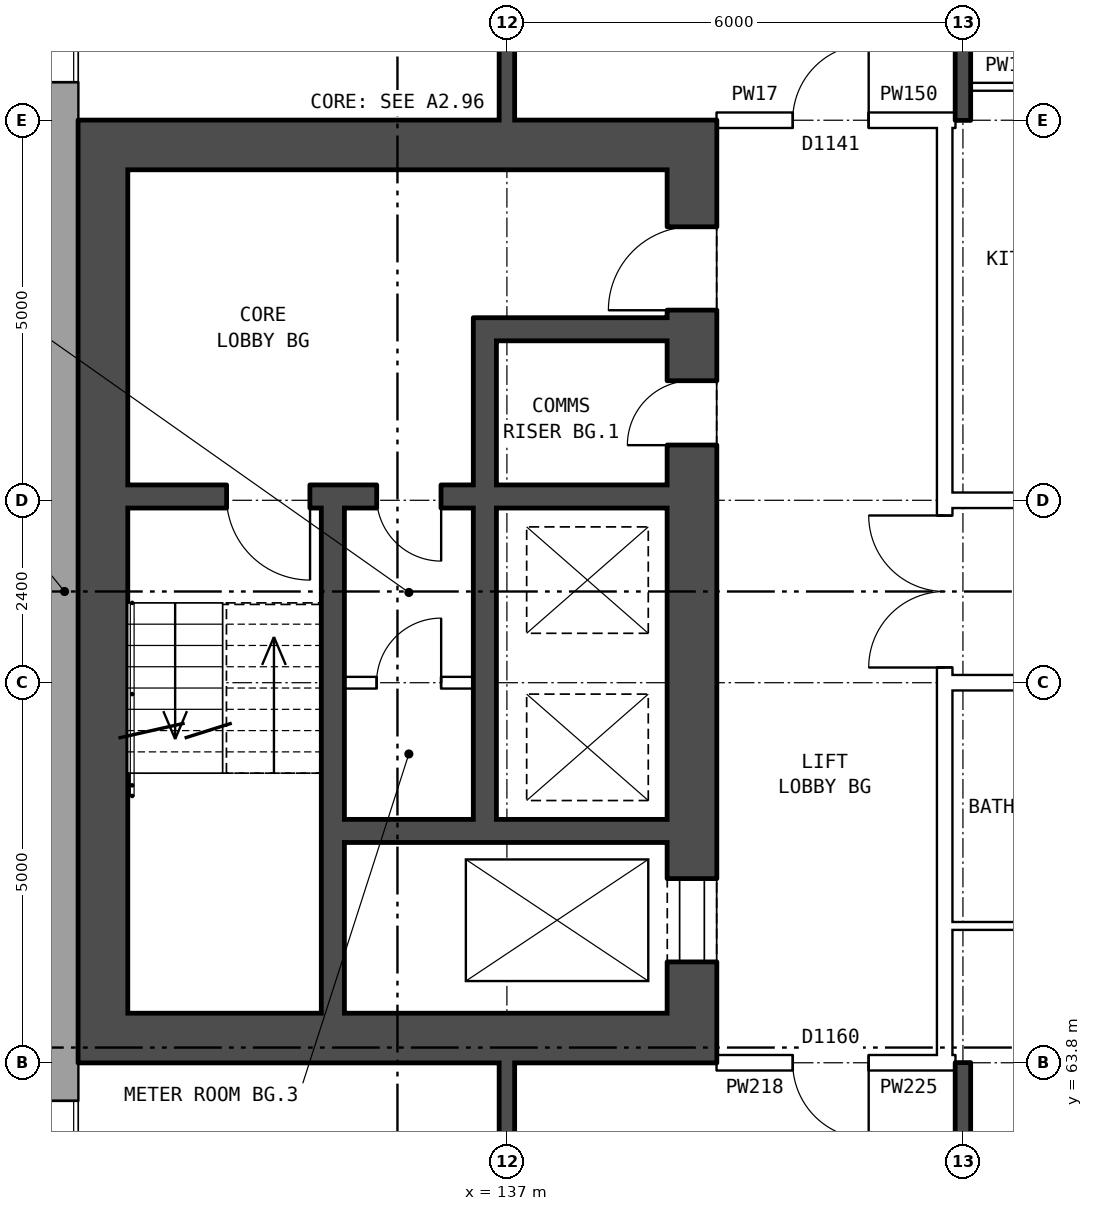
"""IFC4 building model, lengths in metres.
Left out: names, types, materials, properties, quantities, classifications, styles, units other than length and angle.
Written with IfcOpenShell. Run it as: python <this file> out.ifc"""

import sys

from ifc_helpers import new_model, si_unit, direction, frame, frame_2d, origin, place, context, subcontext, project, spatial, rectangle, extrude, element, fill, save


model = new_model("IFC4")
c1 = context("Model", 3, precision=1e-05, world=origin(), true_north=direction((0.0, 1.0)))
c2 = subcontext(c1, "Body", "Model", "MODEL_VIEW")
j1 = project(units=[si_unit("LENGTHUNIT", "METRE"), si_unit("PLANEANGLEUNIT", "RADIAN")], contexts=[c1])
p1 = place(None, origin())
s1 = spatial("IfcSite", under=j1, at=p1, CompositionType="ELEMENT")
p2 = place(p1, origin())
s2 = spatial("IfcBuilding", under=s1, at=p2, CompositionType="ELEMENT")
p3 = place(p2, frame((0.0, 0.0, 96.4)))
s3 = spatial("IfcBuildingStorey", under=s2, at=p3, CompositionType="ELEMENT", Elevation=96.4)
p4 = place(p3, frame((131.18, 82.925, 0.0), z_axis=(0.0, 0.0, 1.0), x_axis=(0.0, -1.0, 0.0)))
e1 = element("IfcWall", 1, at=p4, inside=s3, PredefinedType="STANDARD", context=c2, shape_type="SweptSolid", body=[
    extrude(rectangle(XDim=25.851, YDim=0.36, at=frame_2d((12.925, 0.0))), origin(), (0.0, 0.0, 1.0), 2.85),
])
p5 = place(p4, frame((1.425, 0.0, 0.8)))
e2 = element("IfcOpeningElement", 2, at=p5, cuts=e1, PredefinedType="OPENING", context=c2, shape_type="SweptSolid", body=[
    extrude(rectangle(XDim=1.0, YDim=1.2, at=frame_2d((0.5, 0.6))), frame((0.0, 0.19, 0.0), z_axis=(0.0, -1.0, 0.0), x_axis=(1.0, 0.0, 0.0)), (0.0, 0.0, 1.0), 0.38),
])
p6 = place(p4, frame((4.625, 0.0, 0.8)))
e3 = element("IfcOpeningElement", 3, at=p6, cuts=e1, PredefinedType="OPENING", context=c2, shape_type="SweptSolid", body=[
    extrude(rectangle(XDim=1.6, YDim=1.8, at=frame_2d((0.8, 0.9))), frame((0.0, 0.19, 0.0), z_axis=(0.0, -1.0, 0.0), x_axis=(1.0, 0.0, 0.0)), (0.0, 0.0, 1.0), 0.38),
])
p7 = place(p4, frame((19.625, 0.0, 0.8)))
e4 = element("IfcOpeningElement", 4, at=p7, cuts=e1, PredefinedType="OPENING", context=c2, shape_type="SweptSolid", body=[
    extrude(rectangle(XDim=1.6, YDim=1.8, at=frame_2d((0.8, 0.9))), frame((0.0, 0.19, 0.0), z_axis=(0.0, -1.0, 0.0), x_axis=(1.0, 0.0, 0.0)), (0.0, 0.0, 1.0), 0.38),
])
p8 = place(p4, frame((21.525, 0.0, 0.8)))
e5 = element("IfcOpeningElement", 5, at=p8, cuts=e1, PredefinedType="OPENING", context=c2, shape_type="SweptSolid", body=[
    extrude(rectangle(XDim=1.4, YDim=1.8, at=frame_2d((0.7, 0.9))), frame((0.0, 0.19, 0.0), z_axis=(0.0, -1.0, 0.0), x_axis=(1.0, 0.0, 0.0)), (0.0, 0.0, 1.0), 0.38),
])
p9 = place(p4, frame((2.725, 0.0, 0.8)))
e6 = element("IfcOpeningElement", 6, at=p9, cuts=e1, PredefinedType="OPENING", context=c2, shape_type="SweptSolid", body=[
    extrude(rectangle(XDim=1.4, YDim=1.8, at=frame_2d((0.7, 0.9))), frame((0.0, 0.19, 0.0), z_axis=(0.0, -1.0, 0.0), x_axis=(1.0, 0.0, 0.0)), (0.0, 0.0, 1.0), 0.38),
])
p10 = place(p4, frame((23.225, 0.0, 0.8)))
e7 = element("IfcOpeningElement", 7, at=p10, cuts=e1, PredefinedType="OPENING", context=c2, shape_type="SweptSolid", body=[
    extrude(rectangle(XDim=1.0, YDim=1.2, at=frame_2d((0.5, 0.6))), frame((0.0, 0.19, 0.0), z_axis=(0.0, -1.0, 0.0), x_axis=(1.0, 0.0, 0.0)), (0.0, 0.0, 1.0), 0.38),
])
p11 = place(p3, frame((139.435, 64.45, 0.0), z_axis=(0.0, 0.0, 1.0), x_axis=(0.0, 1.0, 0.0)))
e8 = element("IfcWall", 8, at=p11, inside=s3, PredefinedType="SHEAR", context=c2, shape_type="SweptSolid", body=[
    extrude(rectangle(XDim=11.1, YDim=0.65, at=frame_2d((5.55, 0.0))), origin(), (0.0, 0.0, 1.0), 2.85),
])
p12 = place(p11, frame((0.675, 0.0, 0.0)))
e9 = element("IfcOpeningElement", 9, at=p12, cuts=e8, PredefinedType="OPENING", context=c2, shape_type="SweptSolid", body=[
    extrude(rectangle(XDim=1.1, YDim=2.1, at=frame_2d((0.55, 1.05))), frame((0.0, 0.335, 0.0), z_axis=(0.0, -1.0, 0.0), x_axis=(1.0, 0.0, 0.0)), (0.0, 0.0, 1.0), 0.67),
])
p13 = place(p11, frame((9.25, 0.0, 0.0)))
e10 = element("IfcOpeningElement", 10, at=p13, cuts=e8, PredefinedType="OPENING", context=c2, shape_type="SweptSolid", body=[
    extrude(rectangle(XDim=1.1, YDim=2.1, at=frame_2d((0.55, 1.05))), frame((0.0, 0.335, 0.0), z_axis=(0.0, -1.0, 0.0), x_axis=(1.0, 0.0, 0.0)), (0.0, 0.0, 1.0), 0.67),
])
p14 = place(p11, frame((7.475, 0.0, 0.0)))
e11 = element("IfcOpeningElement", 11, at=p14, cuts=e8, PredefinedType="OPENING", context=c2, shape_type="SweptSolid", body=[
    extrude(rectangle(XDim=0.85, YDim=2.1, at=frame_2d((0.425, 1.05))), frame((0.0, 0.335, 0.0), z_axis=(0.0, -1.0, 0.0), x_axis=(1.0, 0.0, 0.0)), (0.0, 0.0, 1.0), 0.67),
])
p15 = place(p3, frame((131.685, 64.45, 0.0), z_axis=(0.0, 0.0, 1.0), x_axis=(0.0, 1.0, 0.0)))
e12 = element("IfcWall", 12, at=p15, inside=s3, PredefinedType="SHEAR", context=c2, shape_type="SweptSolid", body=[
    extrude(rectangle(XDim=11.1, YDim=0.65, at=frame_2d((5.55, 0.0))), origin(), (0.0, 0.0, 1.0), 2.85),
])
for number, where, z_axis, x_axis in (
    (13, (139.76, 64.125, 0.0), (0.0, 0.0, 1.0), (-1.0, 0.0, 0.0)),
    (14, (139.76, 75.875, 0.0), (0.0, 0.0, 1.0), (-1.0, 0.0, 0.0)),
):
    element("IfcWall", number, at=place(p3, frame(where, z_axis=z_axis, x_axis=x_axis)), inside=s3, PredefinedType="SHEAR", context=c2, shape_type="SweptSolid", body=[
        extrude(rectangle(XDim=8.4, YDim=0.65, at=frame_2d((4.2, 0.0))), origin(), (0.0, 0.0, 1.0), 2.85),
    ])
p16 = place(p3, frame((139.11, 66.85, 0.0), z_axis=(0.0, 0.0, 1.0), x_axis=(-1.0, 0.0, 0.0)))
e15 = element("IfcWall", 15, at=p16, inside=s3, PredefinedType="SHEAR", context=c2, shape_type="SweptSolid", body=[
    extrude(rectangle(XDim=4.25, YDim=0.3, at=frame_2d((2.125, 0.0))), origin(), (0.0, 0.0, 1.0), 2.85),
])
p17 = place(p3, frame((136.56, 68.8, 0.0), z_axis=(0.0, 0.0, 1.0), x_axis=(-1.0, 0.0, 0.0)))
e16 = element("IfcWall", 16, at=p17, inside=s3, PredefinedType="PARTITIONING", context=c2, shape_type="SweptSolid", body=[
    extrude(rectangle(XDim=1.7, YDim=0.15, at=frame_2d((0.85, 0.0))), origin(), (0.0, 0.0, 1.0), 2.85),
])
p18 = place(p17, frame((0.425, 0.0, 0.0)))
e17 = element("IfcOpeningElement", 17, at=p18, cuts=e16, PredefinedType="OPENING", context=c2, shape_type="SweptSolid", body=[
    extrude(rectangle(XDim=0.85, YDim=2.1, at=frame_2d((0.425, 1.05))), frame((0.0, 0.085, 0.0), z_axis=(0.0, -1.0, 0.0), x_axis=(1.0, 0.0, 0.0)), (0.0, 0.0, 1.0), 0.17),
])
p19 = place(p3, frame((139.11, 71.25, 0.0), z_axis=(0.0, 0.0, 1.0), x_axis=(-1.0, 0.0, 0.0)))
e18 = element("IfcWall", 18, at=p19, inside=s3, PredefinedType="SHEAR", context=c2, shape_type="SweptSolid", body=[
    extrude(rectangle(XDim=7.1, YDim=0.3, at=frame_2d((3.55, 0.0))), origin(), (0.0, 0.0, 1.0), 2.85),
])
p20 = place(p19, frame((4.7, 0.0, 0.0)))
e19 = element("IfcOpeningElement", 19, at=p20, cuts=e18, PredefinedType="OPENING", context=c2, shape_type="SweptSolid", body=[
    extrude(rectangle(XDim=1.1, YDim=2.1, at=frame_2d((0.55, 1.05))), frame((0.0, 0.16, 0.0), z_axis=(0.0, -1.0, 0.0), x_axis=(1.0, 0.0, 0.0)), (0.0, 0.0, 1.0), 0.32),
])
p21 = place(p19, frame((2.975, 0.0, 0.0)))
e20 = element("IfcOpeningElement", 20, at=p21, cuts=e18, PredefinedType="OPENING", context=c2, shape_type="SweptSolid", body=[
    extrude(rectangle(XDim=0.85, YDim=2.1, at=frame_2d((0.425, 1.05))), frame((0.0, 0.16, 0.0), z_axis=(0.0, -1.0, 0.0), x_axis=(1.0, 0.0, 0.0)), (0.0, 0.0, 1.0), 0.32),
])
p22 = place(p3, frame((139.11, 73.45, 0.0), z_axis=(0.0, 0.0, 1.0), x_axis=(-1.0, 0.0, 0.0)))
e21 = element("IfcWall", 21, at=p22, inside=s3, PredefinedType="SHEAR", context=c2, shape_type="SweptSolid", body=[
    extrude(rectangle(XDim=2.25, YDim=0.3, at=frame_2d((1.125, 0.0))), origin(), (0.0, 0.0, 1.0), 2.85),
])
p23 = place(p3, frame((136.71, 67.0, 0.0), z_axis=(0.0, 0.0, 1.0), x_axis=(0.0, 1.0, 0.0)))
e22 = element("IfcWall", 22, at=p23, inside=s3, PredefinedType="SHEAR", context=c2, shape_type="SweptSolid", body=[
    extrude(rectangle(XDim=4.1, YDim=0.3, at=frame_2d((2.05, 0.0))), origin(), (0.0, 0.0, 1.0), 2.85),
])
p24 = place(p3, frame((136.71, 71.4, 0.0), z_axis=(0.0, 0.0, 1.0), x_axis=(0.0, 1.0, 0.0)))
e23 = element("IfcWall", 23, at=p24, inside=s3, PredefinedType="SHEAR", context=c2, shape_type="SweptSolid", body=[
    extrude(rectangle(XDim=2.2, YDim=0.3, at=frame_2d((1.1, 0.0))), origin(), (0.0, 0.0, 1.0), 2.85),
])
p25 = place(p3, frame((134.71, 64.45, 0.0), z_axis=(0.0, 0.0, 1.0), x_axis=(0.0, 1.0, 0.0)))
e24 = element("IfcWall", 24, at=p25, inside=s3, PredefinedType="SHEAR", context=c2, shape_type="SweptSolid", body=[
    extrude(rectangle(XDim=6.65, YDim=0.3, at=frame_2d((3.325, 0.0))), origin(), (0.0, 0.0, 1.0), 2.85),
])
p26 = place(p3, frame((142.76, 63.9, 0.0), z_axis=(0.0, 0.0, 1.0), x_axis=(0.0, 1.0, 0.0)))
e25 = element("IfcWall", 25, at=p26, inside=s3, PredefinedType="PARTITIONING", context=c2, shape_type="SweptSolid", body=[
    extrude(rectangle(XDim=12.2, YDim=0.2, at=frame_2d((6.1, 0.0))), origin(), (0.0, 0.0, 1.0), 2.85),
])
p27 = place(p26, frame((5.1, 0.0, 0.0)))
e26 = element("IfcOpeningElement", 26, at=p27, cuts=e25, PredefinedType="OPENING", context=c2, shape_type="SweptSolid", body=[
    extrude(rectangle(XDim=2.0, YDim=2.1, at=frame_2d((1.0, 1.05))), frame((0.0, 0.11, 0.0), z_axis=(0.0, -1.0, 0.0), x_axis=(1.0, 0.0, 0.0)), (0.0, 0.0, 1.0), 0.22),
])
p28 = place(p3, frame((139.76, 63.8, 0.0), z_axis=(0.0, 0.0, 1.0), x_axis=(1.0, 0.0, 0.0)))
e27 = element("IfcWall", 27, at=p28, inside=s3, PredefinedType="PARTITIONING", context=c2, shape_type="SweptSolid", body=[
    extrude(rectangle(XDim=3.0, YDim=0.2, at=frame_2d((1.5, 0.0))), origin(), (0.0, 0.0, 1.0), 2.85),
])
p29 = place(p28, frame((1.0, 0.0, 0.0)))
e28 = element("IfcOpeningElement", 28, at=p29, cuts=e27, PredefinedType="OPENING", context=c2, shape_type="SweptSolid", body=[
    extrude(rectangle(XDim=1.0, YDim=2.1, at=frame_2d((0.5, 1.05))), frame((0.0, 0.11, 0.0), z_axis=(0.0, -1.0, 0.0), x_axis=(1.0, 0.0, 0.0)), (0.0, 0.0, 1.0), 0.22),
])
p30 = place(p3, frame((142.76, 63.8, 0.0), z_axis=(0.0, 0.0, 1.0), x_axis=(1.0, 0.0, 0.0)))
e29 = element("IfcWall", 29, at=p30, inside=s3, PredefinedType="PARTITIONING", context=c2, shape_type="SweptSolid", body=[
    extrude(rectangle(XDim=0.14, YDim=0.2, at=frame_2d((0.07, 0.0))), origin(), (0.0, 0.0, 1.0), 2.85),
])
p31 = place(p3, frame((142.76, 65.6, 0.0), z_axis=(0.0, 0.0, 1.0), x_axis=(1.0, 0.0, 0.0)))
e30 = element("IfcWall", 30, at=p31, inside=s3, PredefinedType="PARTITIONING", context=c2, shape_type="SweptSolid", body=[
    extrude(rectangle(XDim=3.24, YDim=0.1, at=frame_2d((1.62, 0.0))), origin(), (0.0, 0.0, 1.0), 2.85),
])
p32 = place(p3, frame((142.76, 68.8, 0.0), z_axis=(0.0, 0.0, 1.0), x_axis=(1.0, 0.0, 0.0)))
e31 = element("IfcWall", 31, at=p32, inside=s3, PredefinedType="PARTITIONING", context=c2, shape_type="SweptSolid", body=[
    extrude(rectangle(XDim=14.48, YDim=0.2, at=frame_2d((7.24, 0.0))), origin(), (0.0, 0.0, 1.0), 2.85),
])
p33 = place(p32, frame((4.24, 0.0, 0.0)))
e32 = element("IfcOpeningElement", 32, at=p33, cuts=e31, PredefinedType="OPENING", context=c2, shape_type="SweptSolid", body=[
    extrude(rectangle(XDim=1.0, YDim=2.1, at=frame_2d((0.5, 1.05))), frame((0.0, 0.11, 0.0), z_axis=(0.0, -1.0, 0.0), x_axis=(1.0, 0.0, 0.0)), (0.0, 0.0, 1.0), 0.22),
])
p34 = place(p32, frame((7.24, 0.0, 0.0)))
e33 = element("IfcOpeningElement", 33, at=p34, cuts=e31, PredefinedType="OPENING", context=c2, shape_type="SweptSolid", body=[
    extrude(rectangle(XDim=1.0, YDim=2.1, at=frame_2d((0.5, 1.05))), frame((0.0, 0.11, 0.0), z_axis=(0.0, -1.0, 0.0), x_axis=(1.0, 0.0, 0.0)), (0.0, 0.0, 1.0), 0.22),
])
p35 = place(p3, frame((142.76, 71.2, 0.0), z_axis=(0.0, 0.0, 1.0), x_axis=(1.0, 0.0, 0.0)))
e34 = element("IfcWall", 34, at=p35, inside=s3, PredefinedType="PARTITIONING", context=c2, shape_type="SweptSolid", body=[
    extrude(rectangle(XDim=14.48, YDim=0.2, at=frame_2d((7.24, 0.0))), origin(), (0.0, 0.0, 1.0), 2.85),
])
p36 = place(p35, frame((1.12, 0.0, 0.0)))
e35 = element("IfcOpeningElement", 35, at=p36, cuts=e34, PredefinedType="OPENING", context=c2, shape_type="SweptSolid", body=[
    extrude(rectangle(XDim=1.0, YDim=2.1, at=frame_2d((0.5, 1.05))), frame((0.0, 0.11, 0.0), z_axis=(0.0, -1.0, 0.0), x_axis=(1.0, 0.0, 0.0)), (0.0, 0.0, 1.0), 0.22),
])
p37 = place(p35, frame((10.24, 0.0, 0.0)))
e36 = element("IfcOpeningElement", 36, at=p37, cuts=e34, PredefinedType="OPENING", context=c2, shape_type="SweptSolid", body=[
    extrude(rectangle(XDim=1.0, YDim=2.1, at=frame_2d((0.5, 1.05))), frame((0.0, 0.11, 0.0), z_axis=(0.0, -1.0, 0.0), x_axis=(1.0, 0.0, 0.0)), (0.0, 0.0, 1.0), 0.22),
])
p38 = place(p3, frame((139.76, 76.2, 0.0), z_axis=(0.0, 0.0, 1.0), x_axis=(1.0, 0.0, 0.0)))
e37 = element("IfcWall", 37, at=p38, inside=s3, PredefinedType="PARTITIONING", context=c2, shape_type="SweptSolid", body=[
    extrude(rectangle(XDim=3.0, YDim=0.2, at=frame_2d((1.5, 0.0))), origin(), (0.0, 0.0, 1.0), 2.85),
])
p39 = place(p38, frame((1.0, 0.0, 0.0)))
e38 = element("IfcOpeningElement", 38, at=p39, cuts=e37, PredefinedType="OPENING", context=c2, shape_type="SweptSolid", body=[
    extrude(rectangle(XDim=1.0, YDim=2.1, at=frame_2d((0.5, 1.05))), frame((0.0, 0.11, 0.0), z_axis=(0.0, -1.0, 0.0), x_axis=(1.0, 0.0, 0.0)), (0.0, 0.0, 1.0), 0.22),
])
p40 = place(p3, frame((142.76, 76.2, 0.0), z_axis=(0.0, 0.0, 1.0), x_axis=(1.0, 0.0, 0.0)))
e39 = element("IfcWall", 39, at=p40, inside=s3, PredefinedType="PARTITIONING", context=c2, shape_type="SweptSolid", body=[
    extrude(rectangle(XDim=0.14, YDim=0.2, at=frame_2d((0.07, 0.0))), origin(), (0.0, 0.0, 1.0), 2.85),
])
p41 = place(p3, frame((143.1, 76.64, 0.0), z_axis=(0.0, 0.0, 1.0), x_axis=(1.0, 0.0, 0.0)))
e40 = element("IfcWall", 40, at=p41, inside=s3, PredefinedType="PARTITIONING", context=c2, shape_type="SweptSolid", body=[
    extrude(rectangle(XDim=2.9, YDim=0.1, at=frame_2d((1.45, 0.0))), origin(), (0.0, 0.0, 1.0), 2.85),
])
p42 = place(p41, frame((1.0, 0.0, 0.0)))
e41 = element("IfcOpeningElement", 41, at=p42, cuts=e40, PredefinedType="OPENING", context=c2, shape_type="SweptSolid", body=[
    extrude(rectangle(XDim=0.9, YDim=2.1, at=frame_2d((0.45, 1.05))), frame((0.0, 0.06, 0.0), z_axis=(0.0, -1.0, 0.0), x_axis=(1.0, 0.0, 0.0)), (0.0, 0.0, 1.0), 0.12),
])
p43 = place(p3, frame((137.0, 54.36, 0.0), z_axis=(0.0, 0.0, 1.0), x_axis=(0.0, 1.0, 0.0)))
e42 = element("IfcWall", 42, at=p43, inside=s3, PredefinedType="SOLIDWALL", context=c2, shape_type="SweptSolid", body=[
    extrude(rectangle(XDim=9.44, YDim=0.2, at=frame_2d((4.72, 0.0))), origin(), (0.0, 0.0, 1.0), 2.85),
])
p44 = place(p43, frame((1.37, 0.0, 0.0)))
e43 = element("IfcOpeningElement", 43, at=p44, cuts=e42, PredefinedType="OPENING", context=c2, shape_type="SweptSolid", body=[
    extrude(rectangle(XDim=0.9, YDim=2.1, at=frame_2d((0.45, 1.05))), frame((0.0, 0.11, 0.0), z_axis=(0.0, -1.0, 0.0), x_axis=(1.0, 0.0, 0.0)), (0.0, 0.0, 1.0), 0.22),
])
p45 = place(p43, frame((7.04, 0.0, 0.0)))
e44 = element("IfcOpeningElement", 44, at=p45, cuts=e42, PredefinedType="OPENING", context=c2, shape_type="SweptSolid", body=[
    extrude(rectangle(XDim=0.9, YDim=2.1, at=frame_2d((0.45, 1.05))), frame((0.0, 0.11, 0.0), z_axis=(0.0, -1.0, 0.0), x_axis=(1.0, 0.0, 0.0)), (0.0, 0.0, 1.0), 0.22),
])
p46 = place(p3, frame((137.0, 76.2, 0.0), z_axis=(0.0, 0.0, 1.0), x_axis=(0.0, 1.0, 0.0)))
e45 = element("IfcWall", 45, at=p46, inside=s3, PredefinedType="SOLIDWALL", context=c2, shape_type="SweptSolid", body=[
    extrude(rectangle(XDim=9.44, YDim=0.2, at=frame_2d((4.72, 0.0))), origin(), (0.0, 0.0, 1.0), 2.85),
])
p47 = place(p46, frame((1.35, 0.0, 0.0)))
e46 = element("IfcOpeningElement", 46, at=p47, cuts=e45, PredefinedType="OPENING", context=c2, shape_type="SweptSolid", body=[
    extrude(rectangle(XDim=0.9, YDim=2.1, at=frame_2d((0.45, 1.05))), frame((0.0, 0.11, 0.0), z_axis=(0.0, -1.0, 0.0), x_axis=(1.0, 0.0, 0.0)), (0.0, 0.0, 1.0), 0.22),
])
for number, where, z_axis, x_axis in (
    (47, (143.0, 54.36, 0.0), (0.0, 0.0, 1.0), (0.0, 1.0, 0.0)),
    (48, (143.0, 76.2, 0.0), (0.0, 0.0, 1.0), (0.0, 1.0, 0.0)),
):
    element("IfcWall", number, at=place(p3, frame(where, z_axis=z_axis, x_axis=x_axis)), inside=s3, PredefinedType="SOLIDWALL", context=c2, shape_type="SweptSolid", body=[
        extrude(rectangle(XDim=9.44, YDim=0.2, at=frame_2d((4.72, 0.0))), origin(), (0.0, 0.0, 1.0), 2.85),
    ])
p48 = place(p6, origin())
e49 = element("IfcWindow", 49, at=p48, inside=s3, PartitioningType="SINGLE_PANEL", PredefinedType="WINDOW", context=c2, shape_type="SweptSolid", body=[
    extrude(rectangle(XDim=1.6, YDim=1.8, at=frame_2d((0.8, 0.9))), frame((0.0, 0.15, 0.0), z_axis=(0.0, -1.0, 0.0), x_axis=(1.0, 0.0, 0.0)), (0.0, 0.0, 1.0), 0.06),
])
fill(e3, e49)
p49 = place(p7, origin())
e50 = element("IfcWindow", 50, at=p49, inside=s3, PartitioningType="SINGLE_PANEL", PredefinedType="WINDOW", context=c2, shape_type="SweptSolid", body=[
    extrude(rectangle(XDim=1.6, YDim=1.8, at=frame_2d((0.8, 0.9))), frame((0.0, 0.15, 0.0), z_axis=(0.0, -1.0, 0.0), x_axis=(1.0, 0.0, 0.0)), (0.0, 0.0, 1.0), 0.06),
])
fill(e4, e50)
p50 = place(p12, origin())
e51 = element("IfcDoor", 51, at=p50, inside=s3, OperationType="DOUBLE_DOOR_SLIDING", PredefinedType="DOOR", context=c2, shape_type="SweptSolid", body=[
    extrude(rectangle(XDim=1.1, YDim=2.1, at=frame_2d((0.55, 1.05))), frame((0.0, 0.31, 0.0), z_axis=(0.0, -1.0, 0.0), x_axis=(1.0, 0.0, 0.0)), (0.0, 0.0, 1.0), 0.05),
])
fill(e9, e51)
p51 = place(p13, origin())
e52 = element("IfcDoor", 52, at=p51, inside=s3, OperationType="SINGLE_SWING_LEFT", PredefinedType="DOOR", context=c2, shape_type="SweptSolid", body=[
    extrude(rectangle(XDim=1.1, YDim=2.1, at=frame_2d((0.55, 1.05))), frame((0.0, 0.31, 0.0), z_axis=(0.0, -1.0, 0.0), x_axis=(1.0, 0.0, 0.0)), (0.0, 0.0, 1.0), 0.05),
])
fill(e10, e52)
p52 = place(p20, origin())
e53 = element("IfcDoor", 53, at=p52, inside=s3, OperationType="SINGLE_SWING_LEFT", PredefinedType="DOOR", context=c2, shape_type="SweptSolid", body=[
    extrude(rectangle(XDim=1.1, YDim=2.1, at=frame_2d((0.55, 1.05))), frame((0.0, 0.025, 0.0), z_axis=(0.0, -1.0, 0.0), x_axis=(1.0, 0.0, 0.0)), (0.0, 0.0, 1.0), 0.05),
])
fill(e19, e53)
p53 = place(p14, origin())
e54 = element("IfcDoor", 54, at=p53, inside=s3, OperationType="SINGLE_SWING_LEFT", PredefinedType="DOOR", context=c2, shape_type="SweptSolid", body=[
    extrude(rectangle(XDim=0.85, YDim=2.1, at=frame_2d((0.425, 1.05))), frame((0.0, 0.31, 0.0), z_axis=(0.0, -1.0, 0.0), x_axis=(1.0, 0.0, 0.0)), (0.0, 0.0, 1.0), 0.05),
])
fill(e11, e54)
p54 = place(p21, origin())
e55 = element("IfcDoor", 55, at=p54, inside=s3, OperationType="SINGLE_SWING_LEFT", PredefinedType="DOOR", context=c2, shape_type="SweptSolid", body=[
    extrude(rectangle(XDim=0.85, YDim=2.1, at=frame_2d((0.425, 1.05))), frame((0.0, 0.025, 0.0), z_axis=(0.0, -1.0, 0.0), x_axis=(1.0, 0.0, 0.0)), (0.0, 0.0, 1.0), 0.05),
])
fill(e20, e55)
p55 = place(p18, frame((0.85, 0.0, 0.0), z_axis=(0.0, 0.0, 1.0), x_axis=(-1.0, 0.0, 0.0)))
e56 = element("IfcDoor", 56, at=p55, inside=s3, OperationType="SINGLE_SWING_RIGHT", PredefinedType="DOOR", context=c2, shape_type="SweptSolid", body=[
    extrude(rectangle(XDim=0.85, YDim=2.1, at=frame_2d((0.425, 1.05))), frame((0.0, 0.025, 0.0), z_axis=(0.0, -1.0, 0.0), x_axis=(1.0, 0.0, 0.0)), (0.0, 0.0, 1.0), 0.05),
])
fill(e17, e56)
p56 = place(p27, origin())
e57 = element("IfcDoor", 57, at=p56, inside=s3, OperationType="DOUBLE_DOOR_SINGLE_SWING", PredefinedType="DOOR", context=c2, shape_type="SweptSolid", body=[
    extrude(rectangle(XDim=2.0, YDim=2.1, at=frame_2d((1.0, 1.05))), frame((0.0, 0.025, 0.0), z_axis=(0.0, -1.0, 0.0), x_axis=(1.0, 0.0, 0.0)), (0.0, 0.0, 1.0), 0.05),
])
fill(e26, e57)
p57 = place(p29, frame((1.0, 0.0, 0.0), z_axis=(0.0, 0.0, 1.0), x_axis=(-1.0, 0.0, 0.0)))
e58 = element("IfcDoor", 58, at=p57, inside=s3, OperationType="SINGLE_SWING_LEFT", PredefinedType="DOOR", context=c2, shape_type="SweptSolid", body=[
    extrude(rectangle(XDim=1.0, YDim=2.1, at=frame_2d((0.5, 1.05))), frame((0.0, 0.025, 0.0), z_axis=(0.0, -1.0, 0.0), x_axis=(1.0, 0.0, 0.0)), (0.0, 0.0, 1.0), 0.05),
])
fill(e28, e58)
p58 = place(p39, origin())
e59 = element("IfcDoor", 59, at=p58, inside=s3, OperationType="SINGLE_SWING_RIGHT", PredefinedType="DOOR", context=c2, shape_type="SweptSolid", body=[
    extrude(rectangle(XDim=1.0, YDim=2.1, at=frame_2d((0.5, 1.05))), frame((0.0, 0.025, 0.0), z_axis=(0.0, -1.0, 0.0), x_axis=(1.0, 0.0, 0.0)), (0.0, 0.0, 1.0), 0.05),
])
fill(e38, e59)
save(model, sys.argv[1])
